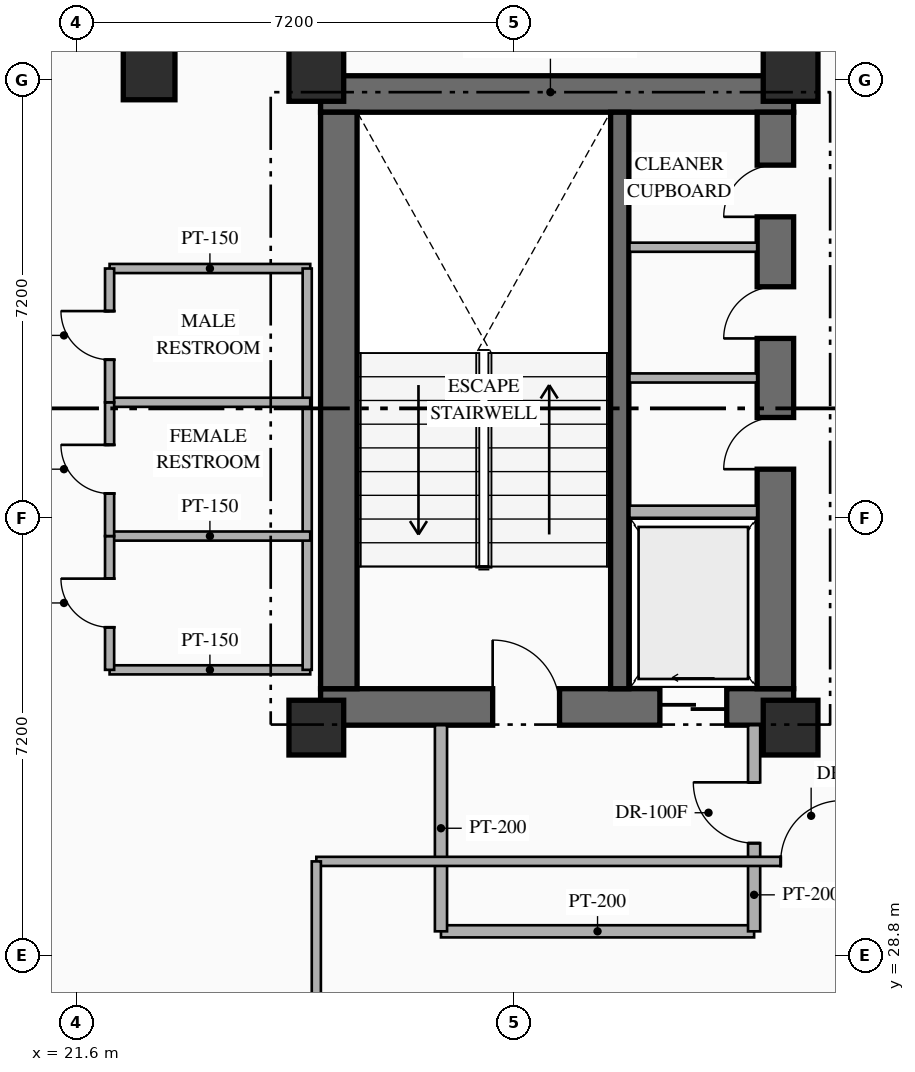
"""IFC4 building model, lengths in metres.
Left out: names, types, materials, properties, quantities, classifications, styles, units other than length and angle.
Written with IfcOpenShell. Run it as: python <this file> out.ifc"""

import sys

from ifc_helpers import new_model, si_unit, direction, frame, frame_2d, origin, origin_2d, place, context, subcontext, project, spatial, rectangle, hollow_rectangle, extrude, element, fill, save


model = new_model("IFC4")
c1 = context("Model", 3, precision=1e-05, world=origin(), true_north=direction((0.0, 1.0)))
c2 = subcontext(c1, "Body", "Model", "MODEL_VIEW")
j1 = project(units=[si_unit("LENGTHUNIT", "METRE"), si_unit("PLANEANGLEUNIT", "RADIAN")], contexts=[c1])
p1 = place(None, origin())
s1 = spatial("IfcSite", under=j1, at=p1, CompositionType="ELEMENT")
p2 = place(p1, origin())
s2 = spatial("IfcBuilding", under=s1, at=p2, CompositionType="ELEMENT")
p3 = place(p2, frame((0.0, 0.0, 126.45)))
s3 = spatial("IfcBuildingStorey", under=s2, at=p3, CompositionType="ELEMENT", Elevation=126.45)
p4 = place(p3, frame((25.62, 32.89, 0.0), z_axis=(0.0, 0.0, 1.0), x_axis=(1.0, 0.0, 0.0)))
e1 = element("IfcWall", 1, at=p4, inside=s3, PredefinedType="SHEAR", context=c2, shape_type="SweptSolid", body=[
    extrude(rectangle(XDim=7.78, YDim=0.6, at=frame_2d((3.89, 0.0))), origin(), (0.0, 0.0, 1.0), 3.6),
])
p5 = place(p4, frame((2.83, 0.0, 0.0)))
e2 = element("IfcOpeningElement", 2, at=p5, cuts=e1, PredefinedType="OPENING", context=c2, shape_type="SweptSolid", body=[
    extrude(rectangle(XDim=1.1, YDim=2.2, at=frame_2d((0.55, 1.1))), frame((0.0, 0.31, 0.0), z_axis=(0.0, -1.0, 0.0), x_axis=(1.0, 0.0, 0.0)), (0.0, 0.0, 1.0), 0.62),
])
p6 = place(p4, frame((5.58, 0.0, 0.0)))
e3 = element("IfcOpeningElement", 3, at=p6, cuts=e1, PredefinedType="OPENING", context=c2, shape_type="SweptSolid", body=[
    extrude(rectangle(XDim=1.1, YDim=2.15, at=frame_2d((0.55, 1.075))), frame((0.0, 0.31, 0.0), z_axis=(0.0, -1.0, 0.0), x_axis=(1.0, 0.0, 0.0)), (0.0, 0.0, 1.0), 0.62),
])
p7 = place(p3, frame((25.62, 42.97, 0.0), z_axis=(0.0, 0.0, 1.0), x_axis=(1.0, 0.0, 0.0)))
e4 = element("IfcWall", 4, at=p7, inside=s3, PredefinedType="SHEAR", context=c2, shape_type="SweptSolid", body=[
    extrude(rectangle(XDim=7.78, YDim=0.6, at=frame_2d((3.89, 0.0))), origin(), (0.0, 0.0, 1.0), 3.6),
])
p8 = place(p3, frame((25.92, 33.19, 0.0), z_axis=(0.0, 0.0, 1.0), x_axis=(0.0, 1.0, 0.0)))
e5 = element("IfcWall", 5, at=p8, inside=s3, PredefinedType="SHEAR", context=c2, shape_type="SweptSolid", body=[
    extrude(rectangle(XDim=9.48, YDim=0.6, at=frame_2d((4.74, 0.0))), origin(), (0.0, 0.0, 1.0), 3.6),
])
p9 = place(p3, frame((33.1, 33.19, 0.0), z_axis=(0.0, 0.0, 1.0), x_axis=(0.0, 1.0, 0.0)))
e6 = element("IfcWall", 6, at=p9, inside=s3, PredefinedType="SHEAR", context=c2, shape_type="SweptSolid", body=[
    extrude(rectangle(XDim=9.48, YDim=0.6, at=frame_2d((4.74, 0.0))), origin(), (0.0, 0.0, 1.0), 3.6),
])
p10 = place(p9, frame((3.61, 0.0, 0.0)))
e7 = element("IfcOpeningElement", 7, at=p10, cuts=e6, PredefinedType="OPENING", context=c2, shape_type="SweptSolid", body=[
    extrude(rectangle(XDim=0.85, YDim=2.08, at=frame_2d((0.425, 1.04))), frame((0.0, 0.31, 0.0), z_axis=(0.0, -1.0, 0.0), x_axis=(1.0, 0.0, 0.0)), (0.0, 0.0, 1.0), 0.62),
])
p11 = place(p9, frame((5.76, 0.0, 0.0)))
e8 = element("IfcOpeningElement", 8, at=p11, cuts=e6, PredefinedType="OPENING", context=c2, shape_type="SweptSolid", body=[
    extrude(rectangle(XDim=0.85, YDim=2.08, at=frame_2d((0.425, 1.04))), frame((0.0, 0.31, 0.0), z_axis=(0.0, -1.0, 0.0), x_axis=(1.0, 0.0, 0.0)), (0.0, 0.0, 1.0), 0.62),
])
p12 = place(p9, frame((7.76, 0.0, 0.0)))
e9 = element("IfcOpeningElement", 9, at=p12, cuts=e6, PredefinedType="OPENING", context=c2, shape_type="SweptSolid", body=[
    extrude(rectangle(XDim=0.85, YDim=2.08, at=frame_2d((0.425, 1.04))), frame((0.0, 0.31, 0.0), z_axis=(0.0, -1.0, 0.0), x_axis=(1.0, 0.0, 0.0)), (0.0, 0.0, 1.0), 0.62),
])
p13 = place(p3, frame((30.54, 33.19, 0.0), z_axis=(0.0, 0.0, 1.0), x_axis=(0.0, 1.0, 0.0)))
e10 = element("IfcWall", 10, at=p13, inside=s3, PredefinedType="SHEAR", context=c2, shape_type="SweptSolid", body=[
    extrude(rectangle(XDim=9.48, YDim=0.3, at=frame_2d((4.74, 0.0))), origin(), (0.0, 0.0, 1.0), 3.6),
])
for number, where, z_axis, x_axis in (
    (11, (25.55, 32.55, 0.0), (0.0, 0.0, 1.0), (1.0, 0.0, 0.0)),
    (12, (33.35, 32.55, 0.0), (0.0, 0.0, 1.0), (1.0, 0.0, 0.0)),
    (13, (25.55, 43.3, 0.0), (0.0, 0.0, 1.0), (1.0, 0.0, 0.0)),
    (14, (33.35, 43.3, 0.0), (0.0, 0.0, 1.0), (1.0, 0.0, 0.0)),
):
    element("IfcColumn", number, at=place(p3, frame(where, z_axis=z_axis, x_axis=x_axis)), inside=s3, PredefinedType="COLUMN", context=c2, shape_type="SweptSolid", body=[
        extrude(rectangle(XDim=0.9, YDim=0.9, at=origin_2d()), origin(), (0.0, 0.0, 1.0), 3.6),
    ])
p14 = place(p3, frame((22.8, 43.3, 0.0), z_axis=(0.0, 0.0, 1.0), x_axis=(1.0, 0.0, 0.0)))
e15 = element("IfcColumn", 15, at=p14, inside=s3, PredefinedType="COLUMN", context=c2, shape_type="SweptSolid", body=[
    extrude(hollow_rectangle(XDim=0.85, YDim=0.85, WallThickness=0.032, at=origin_2d()), origin(), (0.0, 0.0, 1.0), 3.6),
])
p15 = place(p3, frame((30.7, 36.1, 0.0), z_axis=(0.0, 0.0, 1.0), x_axis=(1.0, 0.0, 0.0)))
e16 = element("IfcWall", 16, at=p15, inside=s3, PredefinedType="STANDARD", context=c2, shape_type="SweptSolid", body=[
    extrude(rectangle(XDim=2.1, YDim=0.2, at=frame_2d((1.05, 0.0))), origin(), (0.0, 0.0, 1.0), 3.34),
])
for number, where, z_axis, x_axis in (
    (17, (30.7, 38.3, 0.0), (0.0, 0.0, 1.0), (1.0, 0.0, 0.0)),
    (18, (30.7, 40.45, 0.0), (0.0, 0.0, 1.0), (1.0, 0.0, 0.0)),
):
    element("IfcWall", number, at=place(p3, frame(where, z_axis=z_axis, x_axis=x_axis)), inside=s3, PredefinedType="PARTITIONING", context=c2, shape_type="SweptSolid", body=[
        extrude(rectangle(XDim=2.1, YDim=0.15, at=frame_2d((1.05, 0.0))), origin(), (0.0, 0.0, 1.0), 3.34),
    ])
p16 = place(p3, frame((27.6, 29.2, 0.0), z_axis=(0.0, 0.0, 1.0), x_axis=(1.0, 0.0, 0.0)))
e19 = element("IfcWall", 19, at=p16, inside=s3, PredefinedType="STANDARD", context=c2, shape_type="SweptSolid", body=[
    extrude(rectangle(XDim=5.15, YDim=0.2, at=frame_2d((2.575, 0.0))), origin(), (0.0, 0.0, 1.0), 3.34),
])
p17 = place(p3, frame((27.6, 29.2, 0.0), z_axis=(0.0, 0.0, 1.0), x_axis=(0.0, 1.0, 0.0)))
e20 = element("IfcWall", 20, at=p17, inside=s3, PredefinedType="STANDARD", context=c2, shape_type="SweptSolid", body=[
    extrude(rectangle(XDim=3.39, YDim=0.2, at=frame_2d((1.695, 0.0))), origin(), (0.0, 0.0, 1.0), 3.34),
])
p18 = place(p3, frame((32.75, 29.2, 0.0), z_axis=(0.0, 0.0, 1.0), x_axis=(0.0, 1.0, 0.0)))
e21 = element("IfcWall", 21, at=p18, inside=s3, PredefinedType="STANDARD", context=c2, shape_type="SweptSolid", body=[
    extrude(rectangle(XDim=3.39, YDim=0.2, at=frame_2d((1.695, 0.0))), origin(), (0.0, 0.0, 1.0), 3.34),
])
p19 = place(p18, frame((1.45, 0.0, 0.0)))
e22 = element("IfcOpeningElement", 22, at=p19, cuts=e21, PredefinedType="OPENING", context=c2, shape_type="SweptSolid", body=[
    extrude(rectangle(XDim=1.0, YDim=2.2, at=frame_2d((0.5, 1.1))), frame((0.0, 0.11, 0.0), z_axis=(0.0, -1.0, 0.0), x_axis=(1.0, 0.0, 0.0)), (0.0, 0.0, 1.0), 0.22),
])
for number, where, z_axis, x_axis in (
    (23, (22.15, 33.5, 0.0), (0.0, 0.0, 1.0), (1.0, 0.0, 0.0)),
    (24, (22.15, 40.1, 0.0), (0.0, 0.0, 1.0), (1.0, 0.0, 0.0)),
):
    element("IfcWall", number, at=place(p3, frame(where, z_axis=z_axis, x_axis=x_axis)), inside=s3, PredefinedType="PARTITIONING", context=c2, shape_type="SweptSolid", body=[
        extrude(rectangle(XDim=3.3, YDim=0.15, at=frame_2d((1.65, 0.0))), origin(), (0.0, 0.0, 1.0), 3.34),
    ])
p20 = place(p3, frame((25.4, 33.5, 0.0), z_axis=(0.0, 0.0, 1.0), x_axis=(0.0, 1.0, 0.0)))
e25 = element("IfcWall", 25, at=p20, inside=s3, PredefinedType="PARTITIONING", context=c2, shape_type="SweptSolid", body=[
    extrude(rectangle(XDim=6.6, YDim=0.15, at=frame_2d((3.3, 0.0))), origin(), (0.0, 0.0, 1.0), 3.34),
])
for number, where, z_axis, x_axis in (
    (26, (22.15, 35.7, 0.0), (0.0, 0.0, 1.0), (1.0, 0.0, 0.0)),
    (27, (22.15, 37.9, 0.0), (0.0, 0.0, 1.0), (1.0, 0.0, 0.0)),
):
    element("IfcWall", number, at=place(p3, frame(where, z_axis=z_axis, x_axis=x_axis)), inside=s3, PredefinedType="PARTITIONING", context=c2, shape_type="SweptSolid", body=[
        extrude(rectangle(XDim=3.3, YDim=0.15, at=frame_2d((1.65, 0.0))), origin(), (0.0, 0.0, 1.0), 3.34),
    ])
p21 = place(p3, frame((22.15, 33.5, 0.0), z_axis=(0.0, 0.0, 1.0), x_axis=(0.0, 1.0, 0.0)))
e28 = element("IfcWall", 28, at=p21, inside=s3, PredefinedType="PARTITIONING", context=c2, shape_type="SweptSolid", body=[
    extrude(rectangle(XDim=2.2, YDim=0.15, at=frame_2d((1.1, 0.0))), origin(), (0.0, 0.0, 1.0), 3.34),
])
p22 = place(p21, frame((0.7, 0.0, 0.0)))
e29 = element("IfcOpeningElement", 29, at=p22, cuts=e28, PredefinedType="OPENING", context=c2, shape_type="SweptSolid", body=[
    extrude(rectangle(XDim=0.8, YDim=2.06, at=frame_2d((0.4, 1.03))), frame((0.0, 0.085, 0.0), z_axis=(0.0, -1.0, 0.0), x_axis=(1.0, 0.0, 0.0)), (0.0, 0.0, 1.0), 0.17),
])
p23 = place(p3, frame((22.15, 35.7, 0.0), z_axis=(0.0, 0.0, 1.0), x_axis=(0.0, 1.0, 0.0)))
e30 = element("IfcWall", 30, at=p23, inside=s3, PredefinedType="PARTITIONING", context=c2, shape_type="SweptSolid", body=[
    extrude(rectangle(XDim=2.2, YDim=0.15, at=frame_2d((1.1, 0.0))), origin(), (0.0, 0.0, 1.0), 3.34),
])
p24 = place(p23, frame((0.7, 0.0, 0.0)))
e31 = element("IfcOpeningElement", 31, at=p24, cuts=e30, PredefinedType="OPENING", context=c2, shape_type="SweptSolid", body=[
    extrude(rectangle(XDim=0.8, YDim=2.06, at=frame_2d((0.4, 1.03))), frame((0.0, 0.085, 0.0), z_axis=(0.0, -1.0, 0.0), x_axis=(1.0, 0.0, 0.0)), (0.0, 0.0, 1.0), 0.17),
])
p25 = place(p3, frame((22.15, 37.9, 0.0), z_axis=(0.0, 0.0, 1.0), x_axis=(0.0, 1.0, 0.0)))
e32 = element("IfcWall", 32, at=p25, inside=s3, PredefinedType="PARTITIONING", context=c2, shape_type="SweptSolid", body=[
    extrude(rectangle(XDim=2.2, YDim=0.15, at=frame_2d((1.1, 0.0))), origin(), (0.0, 0.0, 1.0), 3.34),
])
p26 = place(p25, frame((0.7, 0.0, 0.0)))
e33 = element("IfcOpeningElement", 33, at=p26, cuts=e32, PredefinedType="OPENING", context=c2, shape_type="SweptSolid", body=[
    extrude(rectangle(XDim=0.8, YDim=2.06, at=frame_2d((0.4, 1.03))), frame((0.0, 0.085, 0.0), z_axis=(0.0, -1.0, 0.0), x_axis=(1.0, 0.0, 0.0)), (0.0, 0.0, 1.0), 0.17),
])
p27 = place(p3, frame((25.55, 30.35, 0.0), z_axis=(0.0, 0.0, 1.0), x_axis=(1.0, 0.0, 0.0)))
e34 = element("IfcWall", 34, at=p27, inside=s3, PredefinedType="PARTITIONING", context=c2, shape_type="SweptSolid", body=[
    extrude(rectangle(XDim=9.4, YDim=0.15, at=frame_2d((4.7, 0.0))), origin(), (0.0, 0.0, 1.0), 3.34),
])
p28 = place(p27, frame((7.638, 0.0, 0.0)))
e35 = element("IfcOpeningElement", 35, at=p28, cuts=e34, PredefinedType="OPENING", context=c2, shape_type="SweptSolid", body=[
    extrude(rectangle(XDim=1.0, YDim=2.15, at=frame_2d((0.5, 1.075))), frame((0.0, 0.085, 0.0), z_axis=(0.0, -1.0, 0.0), x_axis=(1.0, 0.0, 0.0)), (0.0, 0.0, 1.0), 0.17),
])
p29 = place(p3, frame((25.55, 23.2, 0.0), z_axis=(0.0, 0.0, 1.0), x_axis=(0.0, 1.0, 0.0)))
e36 = element("IfcWall", 36, at=p29, inside=s3, PredefinedType="PARTITIONING", context=c2, shape_type="SweptSolid", body=[
    extrude(rectangle(XDim=7.15, YDim=0.15, at=frame_2d((3.575, 0.0))), origin(), (0.0, 0.0, 1.0), 2.695),
])
p30 = place(p5, origin())
e37 = element("IfcDoor", 37, at=p30, inside=s3, OperationType="SINGLE_SWING_LEFT", PredefinedType="DOOR", context=c2, shape_type="SweptSolid", body=[
    extrude(rectangle(XDim=1.1, YDim=2.2, at=frame_2d((0.55, 1.1))), frame((0.0, 0.025, 0.0), z_axis=(0.0, -1.0, 0.0), x_axis=(1.0, 0.0, 0.0)), (0.0, 0.0, 1.0), 0.05),
])
fill(e2, e37)
p31 = place(p6, origin())
e38 = element("IfcDoor", 38, at=p31, inside=s3, OperationType="SLIDING_TO_LEFT", PredefinedType="USERDEFINED", context=c2, shape_type="SweptSolid", body=[
    extrude(rectangle(XDim=1.1, YDim=2.15, at=frame_2d((0.55, 1.075))), frame((0.0, 0.025, 0.0), z_axis=(0.0, -1.0, 0.0), x_axis=(1.0, 0.0, 0.0)), (0.0, 0.0, 1.0), 0.05),
])
fill(e3, e38)
p32 = place(p10, origin())
e39 = element("IfcDoor", 39, at=p32, inside=s3, OperationType="SINGLE_SWING_LEFT", PredefinedType="DOOR", context=c2, shape_type="SweptSolid", body=[
    extrude(rectangle(XDim=0.85, YDim=2.08, at=frame_2d((0.425, 1.04))), frame((0.0, 0.025, 0.0), z_axis=(0.0, -1.0, 0.0), x_axis=(1.0, 0.0, 0.0)), (0.0, 0.0, 1.0), 0.05),
])
fill(e7, e39)
p33 = place(p11, origin())
e40 = element("IfcDoor", 40, at=p33, inside=s3, OperationType="SINGLE_SWING_LEFT", PredefinedType="DOOR", context=c2, shape_type="SweptSolid", body=[
    extrude(rectangle(XDim=0.85, YDim=2.08, at=frame_2d((0.425, 1.04))), frame((0.0, 0.025, 0.0), z_axis=(0.0, -1.0, 0.0), x_axis=(1.0, 0.0, 0.0)), (0.0, 0.0, 1.0), 0.05),
])
fill(e8, e40)
p34 = place(p12, origin())
e41 = element("IfcDoor", 41, at=p34, inside=s3, OperationType="SINGLE_SWING_LEFT", PredefinedType="DOOR", context=c2, shape_type="SweptSolid", body=[
    extrude(rectangle(XDim=0.85, YDim=2.08, at=frame_2d((0.425, 1.04))), frame((0.0, 0.025, 0.0), z_axis=(0.0, -1.0, 0.0), x_axis=(1.0, 0.0, 0.0)), (0.0, 0.0, 1.0), 0.05),
])
fill(e9, e41)
p35 = place(p19, origin())
e42 = element("IfcDoor", 42, at=p35, inside=s3, OperationType="SINGLE_SWING_RIGHT", PredefinedType="DOOR", context=c2, shape_type="SweptSolid", body=[
    extrude(rectangle(XDim=1.0, YDim=2.2, at=frame_2d((0.5, 1.1))), frame((0.0, 0.025, 0.0), z_axis=(0.0, -1.0, 0.0), x_axis=(1.0, 0.0, 0.0)), (0.0, 0.0, 1.0), 0.05),
])
fill(e22, e42)
p36 = place(p22, origin())
e43 = element("IfcDoor", 43, at=p36, inside=s3, OperationType="SINGLE_SWING_RIGHT", PredefinedType="DOOR", context=c2, shape_type="SweptSolid", body=[
    extrude(rectangle(XDim=0.8, YDim=2.06, at=frame_2d((0.4, 1.03))), frame((0.0, 0.025, 0.0), z_axis=(0.0, -1.0, 0.0), x_axis=(1.0, 0.0, 0.0)), (0.0, 0.0, 1.0), 0.05),
])
fill(e29, e43)
p37 = place(p24, origin())
e44 = element("IfcDoor", 44, at=p37, inside=s3, OperationType="SINGLE_SWING_RIGHT", PredefinedType="DOOR", context=c2, shape_type="SweptSolid", body=[
    extrude(rectangle(XDim=0.8, YDim=2.06, at=frame_2d((0.4, 1.03))), frame((0.0, 0.025, 0.0), z_axis=(0.0, -1.0, 0.0), x_axis=(1.0, 0.0, 0.0)), (0.0, 0.0, 1.0), 0.05),
])
fill(e31, e44)
p38 = place(p26, origin())
e45 = element("IfcDoor", 45, at=p38, inside=s3, OperationType="SINGLE_SWING_RIGHT", PredefinedType="DOOR", context=c2, shape_type="SweptSolid", body=[
    extrude(rectangle(XDim=0.8, YDim=2.06, at=frame_2d((0.4, 1.03))), frame((0.0, 0.025, 0.0), z_axis=(0.0, -1.0, 0.0), x_axis=(1.0, 0.0, 0.0)), (0.0, 0.0, 1.0), 0.05),
])
fill(e33, e45)
p39 = place(p28, origin())
e46 = element("IfcDoor", 46, at=p39, inside=s3, OperationType="SINGLE_SWING_RIGHT", PredefinedType="DOOR", context=c2, shape_type="SweptSolid", body=[
    extrude(rectangle(XDim=1.0, YDim=2.15, at=frame_2d((0.5, 1.075))), frame((0.0, 0.025, 0.0), z_axis=(0.0, -1.0, 0.0), x_axis=(1.0, 0.0, 0.0)), (0.0, 0.0, 1.0), 0.05),
])
fill(e35, e46)
save(model, sys.argv[1])
